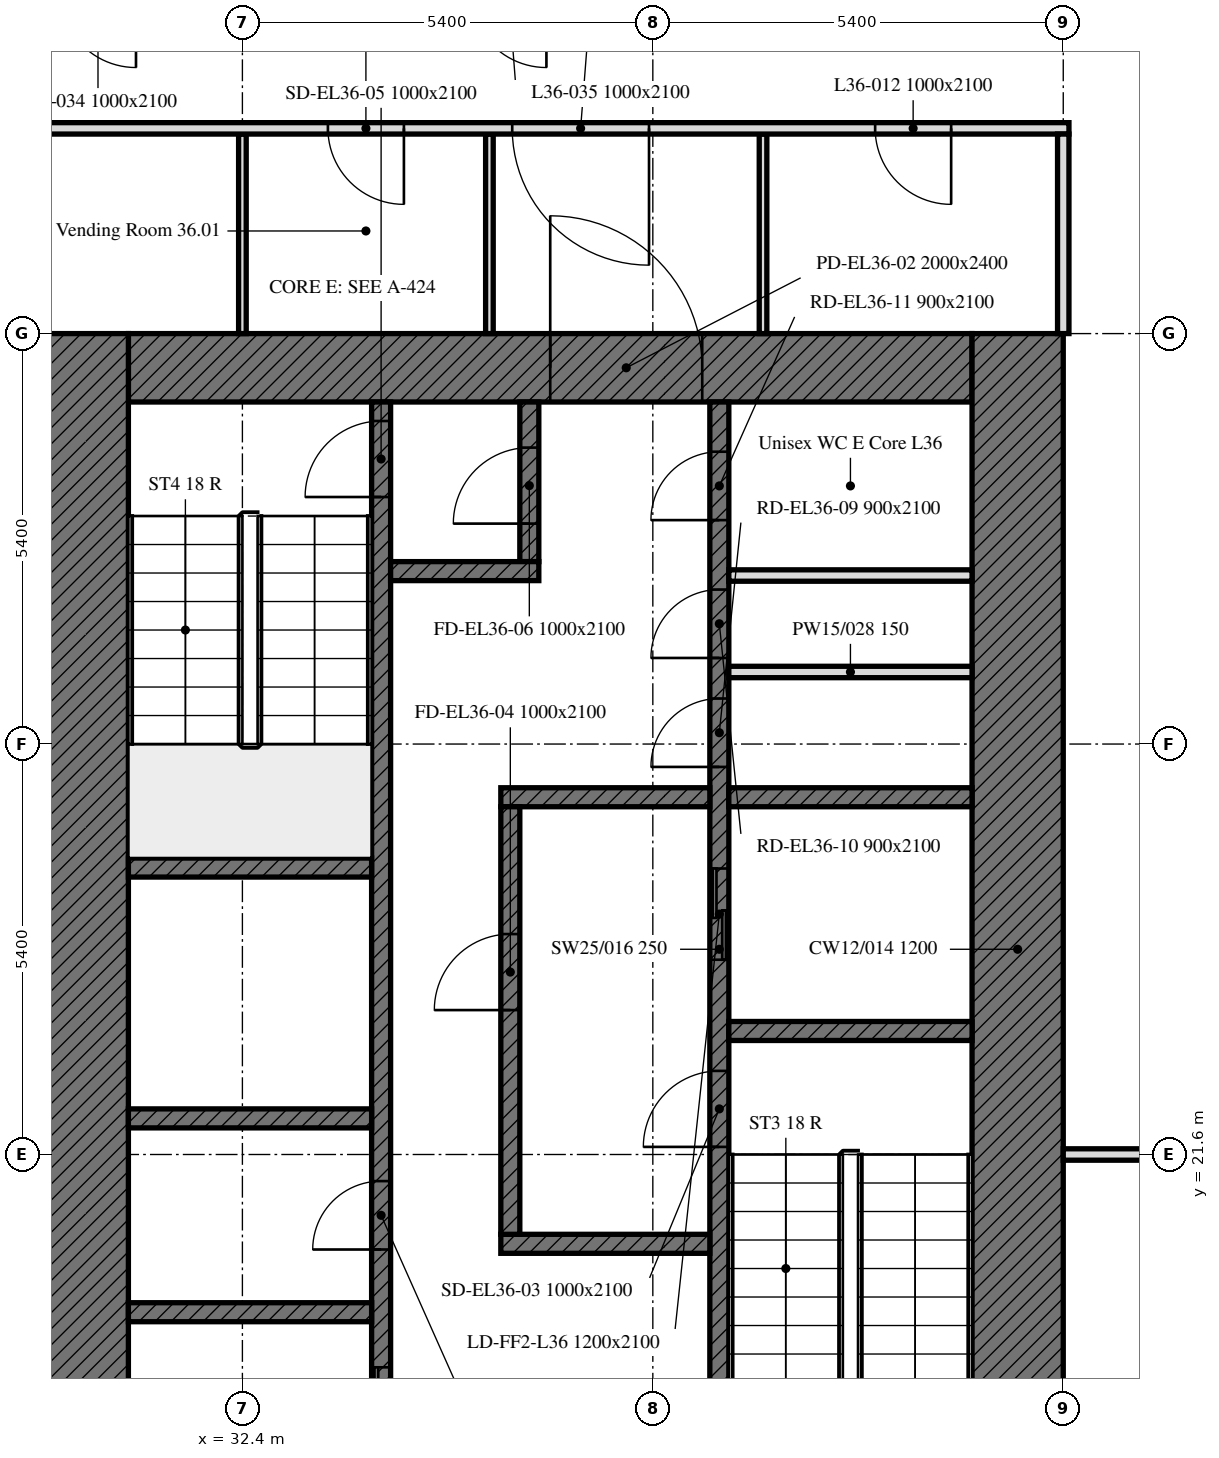
"""IFC4 building model, lengths in metres.
Left out: names, types, materials, properties, quantities, classifications, styles, units other than length and angle.
Written with IfcOpenShell. Run it as: python <this file> out.ifc"""

import sys

from ifc_helpers import new_model, si_unit, direction, frame, frame_2d, origin, place, context, subcontext, project, spatial, rectangle, extrude, element, fill, save


model = new_model("IFC4")
c1 = context("Model", 3, precision=1e-05, world=origin(), true_north=direction((0.0, 1.0)))
c2 = subcontext(c1, "Body", "Model", "MODEL_VIEW")
j1 = project(units=[si_unit("LENGTHUNIT", "METRE"), si_unit("PLANEANGLEUNIT", "RADIAN")], contexts=[c1])
p1 = place(None, origin())
s1 = spatial("IfcSite", under=j1, at=p1, CompositionType="ELEMENT")
p2 = place(p1, origin())
s2 = spatial("IfcBuilding", under=s1, at=p2, CompositionType="ELEMENT")
p3 = place(p2, frame((0.0, 0.0, 156.1)))
s3 = spatial("IfcBuildingStorey", under=s2, at=p3, CompositionType="ELEMENT", Elevation=156.1)
p4 = place(p3, frame((30.9, 31.95, 0.0), z_axis=(0.0, 0.0, 1.0), x_axis=(1.0, 0.0, 0.0)))
e1 = element("IfcWall", 1, at=p4, inside=s3, PredefinedType="SOLIDWALL", context=c2, shape_type="SweptSolid", body=[
    extrude(rectangle(XDim=11.1, YDim=0.9, at=frame_2d((5.55, 0.0))), origin(), (0.0, 0.0, 1.0), 3.0),
])
p5 = place(p4, frame((5.55, 0.0, 0.0)))
e2 = element("IfcOpeningElement", 2, at=p5, cuts=e1, PredefinedType="OPENING", context=c2, shape_type="SweptSolid", body=[
    extrude(rectangle(XDim=2.0, YDim=2.4, at=frame_2d((1.0, 1.2))), frame((0.0, 0.45, 0.0), z_axis=(0.0, -1.0, 0.0), x_axis=(1.0, 0.0, 0.0)), (0.0, 0.0, 1.0), 0.9),
])
for number, where, z_axis, x_axis in (
    (3, (42.6, 32.4, 0.0), (0.0, 0.0, 1.0), (0.0, -1.0, 0.0)),
    (4, (30.3, 16.2, 0.0), (0.0, 0.0, 1.0), (0.0, 1.0, 0.0)),
):
    element("IfcWall", number, at=place(p3, frame(where, z_axis=z_axis, x_axis=x_axis)), inside=s3, PredefinedType="SOLIDWALL", context=c2, shape_type="SweptSolid", body=[
        extrude(rectangle(XDim=16.2, YDim=1.2, at=frame_2d((8.1, 0.0))), origin(), (0.0, 0.0, 1.0), 3.0),
    ])
p6 = place(p3, frame((38.675, 17.1, 0.0), z_axis=(0.0, 0.0, 1.0), x_axis=(0.0, 1.0, 0.0)))
e5 = element("IfcWall", 5, at=p6, inside=s3, PredefinedType="SOLIDWALL", context=c2, shape_type="SweptSolid", body=[
    extrude(rectangle(XDim=14.4, YDim=0.25, at=frame_2d((7.2, 0.0))), origin(), (0.0, 0.0, 1.0), 3.0),
])
p7 = place(p6, frame((4.6, 0.0, 0.0)))
e6 = element("IfcOpeningElement", 6, at=p7, cuts=e5, PredefinedType="OPENING", context=c2, shape_type="SweptSolid", body=[
    extrude(rectangle(XDim=1.0, YDim=2.1, at=frame_2d((0.5, 1.05))), frame((0.0, 0.125, 0.0), z_axis=(0.0, -1.0, 0.0), x_axis=(1.0, 0.0, 0.0)), (0.0, 0.0, 1.0), 0.25),
])
p8 = place(p6, frame((7.062, 0.0, 0.0)))
e7 = element("IfcOpeningElement", 7, at=p8, cuts=e5, PredefinedType="OPENING", context=c2, shape_type="SweptSolid", body=[
    extrude(rectangle(XDim=1.2, YDim=2.1, at=frame_2d((0.6, 1.05))), frame((0.0, 0.125, 0.0), z_axis=(0.0, -1.0, 0.0), x_axis=(1.0, 0.0, 0.0)), (0.0, 0.0, 1.0), 0.25),
])
p9 = place(p6, frame((9.599, 0.0, 0.0)))
e8 = element("IfcOpeningElement", 8, at=p9, cuts=e5, PredefinedType="OPENING", context=c2, shape_type="SweptSolid", body=[
    extrude(rectangle(XDim=0.9, YDim=2.1, at=frame_2d((0.45, 1.05))), frame((0.0, 0.125, 0.0), z_axis=(0.0, -1.0, 0.0), x_axis=(1.0, 0.0, 0.0)), (0.0, 0.0, 1.0), 0.25),
])
p10 = place(p6, frame((11.032, 0.0, 0.0)))
e9 = element("IfcOpeningElement", 9, at=p10, cuts=e5, PredefinedType="OPENING", context=c2, shape_type="SweptSolid", body=[
    extrude(rectangle(XDim=0.9, YDim=2.1, at=frame_2d((0.45, 1.05))), frame((0.0, 0.125, 0.0), z_axis=(0.0, -1.0, 0.0), x_axis=(1.0, 0.0, 0.0)), (0.0, 0.0, 1.0), 0.25),
])
p11 = place(p6, frame((12.846, 0.0, 0.0)))
e10 = element("IfcOpeningElement", 10, at=p11, cuts=e5, PredefinedType="OPENING", context=c2, shape_type="SweptSolid", body=[
    extrude(rectangle(XDim=0.9, YDim=2.1, at=frame_2d((0.45, 1.05))), frame((0.0, 0.125, 0.0), z_axis=(0.0, -1.0, 0.0), x_axis=(1.0, 0.0, 0.0)), (0.0, 0.0, 1.0), 0.25),
])
p12 = place(p3, frame((34.225, 17.1, 0.0), z_axis=(0.0, 0.0, 1.0), x_axis=(0.0, 1.0, 0.0)))
e11 = element("IfcWall", 11, at=p12, inside=s3, PredefinedType="SOLIDWALL", context=c2, shape_type="SweptSolid", body=[
    extrude(rectangle(XDim=14.4, YDim=0.25, at=frame_2d((7.2, 0.0))), origin(), (0.0, 0.0, 1.0), 3.0),
])
p13 = place(p12, frame((13.15, 0.0, 0.0)))
e12 = element("IfcOpeningElement", 12, at=p13, cuts=e11, PredefinedType="OPENING", context=c2, shape_type="SweptSolid", body=[
    extrude(rectangle(XDim=1.0, YDim=2.1, at=frame_2d((0.5, 1.05))), frame((0.0, 0.125, 0.0), z_axis=(0.0, -1.0, 0.0), x_axis=(1.0, 0.0, 0.0)), (0.0, 0.0, 1.0), 0.25),
])
p14 = place(p12, frame((0.6, 0.0, 0.0)))
e13 = element("IfcOpeningElement", 13, at=p14, cuts=e11, PredefinedType="OPENING", context=c2, shape_type="SweptSolid", body=[
    extrude(rectangle(XDim=1.1, YDim=2.1, at=frame_2d((0.55, 1.05))), frame((0.0, 0.125, 0.0), z_axis=(0.0, -1.0, 0.0), x_axis=(1.0, 0.0, 0.0)), (0.0, 0.0, 1.0), 0.25),
])
p15 = place(p12, frame((3.25, 0.0, 0.0)))
e14 = element("IfcOpeningElement", 14, at=p15, cuts=e11, PredefinedType="OPENING", context=c2, shape_type="SweptSolid", body=[
    extrude(rectangle(XDim=0.9, YDim=2.1, at=frame_2d((0.45, 1.05))), frame((0.0, 0.125, 0.0), z_axis=(0.0, -1.0, 0.0), x_axis=(1.0, 0.0, 0.0)), (0.0, 0.0, 1.0), 0.25),
])
p16 = place(p3, frame((38.8, 23.225, 0.0), z_axis=(0.0, 0.0, 1.0), x_axis=(1.0, 0.0, 0.0)))
e15 = element("IfcWall", 15, at=p16, inside=s3, PredefinedType="SOLIDWALL", context=c2, shape_type="SweptSolid", body=[
    extrude(rectangle(XDim=3.2, YDim=0.25, at=frame_2d((1.6, 0.0))), origin(), (0.0, 0.0, 1.0), 3.0),
])
for number, where, z_axis, x_axis in (
    (16, (30.9, 25.375, 0.0), (0.0, 0.0, 1.0), (1.0, 0.0, 0.0)),
    (17, (30.9, 22.075, 0.0), (0.0, 0.0, 1.0), (1.0, 0.0, 0.0)),
):
    element("IfcWall", number, at=place(p3, frame(where, z_axis=z_axis, x_axis=x_axis)), inside=s3, PredefinedType="SOLIDWALL", context=c2, shape_type="SweptSolid", body=[
        extrude(rectangle(XDim=3.2, YDim=0.25, at=frame_2d((1.6, 0.0))), origin(), (0.0, 0.0, 1.0), 3.0),
    ])
p17 = place(p3, frame((38.8, 26.3, 0.0), z_axis=(0.0, 0.0, 1.0), x_axis=(1.0, 0.0, 0.0)))
e18 = element("IfcWall", 18, at=p17, inside=s3, PredefinedType="SOLIDWALL", context=c2, shape_type="SweptSolid", body=[
    extrude(rectangle(XDim=3.2, YDim=0.25, at=frame_2d((1.6, 0.0))), origin(), (0.0, 0.0, 1.0), 3.0),
])
for number, where, z_axis, x_axis in (
    (19, (35.8, 26.3, 0.0), (0.0, 0.0, 1.0), (1.0, 0.0, 0.0)),
    (20, (35.8, 20.425, 0.0), (0.0, 0.0, 1.0), (1.0, 0.0, 0.0)),
):
    element("IfcWall", number, at=place(p3, frame(where, z_axis=z_axis, x_axis=x_axis)), inside=s3, PredefinedType="SOLIDWALL", context=c2, shape_type="SweptSolid", body=[
        extrude(rectangle(XDim=2.75, YDim=0.25, at=frame_2d((1.375, 0.0))), origin(), (0.0, 0.0, 1.0), 3.0),
    ])
p18 = place(p3, frame((36.175, 29.4, 0.0), z_axis=(0.0, 0.0, 1.0), x_axis=(0.0, 1.0, 0.0)))
e21 = element("IfcWall", 21, at=p18, inside=s3, PredefinedType="SOLIDWALL", context=c2, shape_type="SweptSolid", body=[
    extrude(rectangle(XDim=2.1, YDim=0.25, at=frame_2d((1.05, 0.0))), origin(), (0.0, 0.0, 1.0), 3.0),
])
p19 = place(p18, frame((0.5, 0.0, 0.0)))
e22 = element("IfcOpeningElement", 22, at=p19, cuts=e21, PredefinedType="OPENING", context=c2, shape_type="SweptSolid", body=[
    extrude(rectangle(XDim=1.0, YDim=2.1, at=frame_2d((0.5, 1.05))), frame((0.0, 0.125, 0.0), z_axis=(0.0, -1.0, 0.0), x_axis=(1.0, 0.0, 0.0)), (0.0, 0.0, 1.0), 0.25),
])
p20 = place(p3, frame((34.35, 29.275, 0.0), z_axis=(0.0, 0.0, 1.0), x_axis=(1.0, 0.0, 0.0)))
e23 = element("IfcWall", 23, at=p20, inside=s3, PredefinedType="SOLIDWALL", context=c2, shape_type="SweptSolid", body=[
    extrude(rectangle(XDim=1.95, YDim=0.25, at=frame_2d((0.975, 0.0))), origin(), (0.0, 0.0, 1.0), 3.0),
])
p21 = place(p3, frame((35.925, 20.55, 0.0), z_axis=(0.0, 0.0, 1.0), x_axis=(0.0, 1.0, 0.0)))
e24 = element("IfcWall", 24, at=p21, inside=s3, PredefinedType="SOLIDWALL", context=c2, shape_type="SweptSolid", body=[
    extrude(rectangle(XDim=5.625, YDim=0.25, at=frame_2d((2.812, 0.0))), origin(), (0.0, 0.0, 1.0), 3.0),
])
p22 = place(p21, frame((2.95, 0.0, 0.0)))
e25 = element("IfcOpeningElement", 25, at=p22, cuts=e24, PredefinedType="OPENING", context=c2, shape_type="SweptSolid", body=[
    extrude(rectangle(XDim=1.0, YDim=2.1, at=frame_2d((0.5, 1.05))), frame((0.0, 0.125, 0.0), z_axis=(0.0, -1.0, 0.0), x_axis=(1.0, 0.0, 0.0)), (0.0, 0.0, 1.0), 0.25),
])
p23 = place(p3, frame((30.9, 19.525, 0.0), z_axis=(0.0, 0.0, 1.0), x_axis=(1.0, 0.0, 0.0)))
e26 = element("IfcWall", 26, at=p23, inside=s3, PredefinedType="SOLIDWALL", context=c2, shape_type="SweptSolid", body=[
    extrude(rectangle(XDim=3.2, YDim=0.25, at=frame_2d((1.6, 0.0))), origin(), (0.0, 0.0, 1.0), 3.0),
])
for number, where, z_axis, x_axis in (
    (27, (38.8, 27.948, 0.0), (0.0, 0.0, 1.0), (1.0, 0.0, 0.0)),
    (28, (38.8, 29.217, 0.0), (0.0, 0.0, 1.0), (1.0, 0.0, 0.0)),
):
    element("IfcWall", number, at=place(p3, frame(where, z_axis=z_axis, x_axis=x_axis)), inside=s3, PredefinedType="PARTITIONING", context=c2, shape_type="SweptSolid", body=[
        extrude(rectangle(XDim=3.2, YDim=0.15, at=frame_2d((1.6, 0.0))), origin(), (0.0, 0.0, 1.0), 3.0),
    ])
for number, where, z_axis, x_axis in (
    (29, (32.4, 32.4, 0.0), (0.0, 0.0, 1.0), (0.0, 1.0, 0.0)),
    (30, (35.65, 35.025, 0.0), (0.0, 0.0, 1.0), (0.0, -1.0, 0.0)),
    (31, (39.25, 32.4, 0.0), (0.0, 0.0, 1.0), (0.0, 1.0, 0.0)),
):
    element("IfcWall", number, at=place(p3, frame(where, z_axis=z_axis, x_axis=x_axis)), inside=s3, PredefinedType="PARTITIONING", context=c2, shape_type="SweptSolid", body=[
        extrude(rectangle(XDim=2.625, YDim=0.1, at=frame_2d((1.312, 0.0))), origin(), (0.0, 0.0, 1.0), 3.0),
    ])
p24 = place(p3, frame((43.2, 21.6, 0.0), z_axis=(0.0, 0.0, 1.0), x_axis=(1.0, 0.0, 0.0)))
e32 = element("IfcWall", 32, at=p24, inside=s3, PredefinedType="PARTITIONING", context=c2, shape_type="SweptSolid", body=[
    extrude(rectangle(XDim=4.649, YDim=0.15, at=frame_2d((2.325, 0.0))), origin(), (0.0, 0.0, 1.0), 2.4),
])
p25 = place(p3, frame((43.275, 35.1, 0.0), z_axis=(0.0, 0.0, 1.0), x_axis=(-1.0, 0.0, 0.0)))
e33 = element("IfcWall", 33, at=p25, inside=s3, PredefinedType="PARTITIONING", context=c2, shape_type="SweptSolid", body=[
    extrude(rectangle(XDim=37.124, YDim=0.15, at=frame_2d((18.562, 0.0))), origin(), (0.0, 0.0, 1.0), 3.0),
])
p26 = place(p25, frame((18.475, 0.0, 0.0)))
e34 = element("IfcOpeningElement", 34, at=p26, cuts=e33, PredefinedType="OPENING", context=c2, shape_type="SweptSolid", body=[
    extrude(rectangle(XDim=1.0, YDim=2.1, at=frame_2d((0.5, 1.05))), frame((0.0, 0.075, 0.0), z_axis=(0.0, -1.0, 0.0), x_axis=(1.0, 0.0, 0.0)), (0.0, 0.0, 1.0), 0.15),
])
p27 = place(p25, frame((34.095, 0.0, 0.0)))
e35 = element("IfcOpeningElement", 35, at=p27, cuts=e33, PredefinedType="OPENING", context=c2, shape_type="SweptSolid", body=[
    extrude(rectangle(XDim=1.0, YDim=2.1, at=frame_2d((0.5, 1.05))), frame((0.0, 0.075, 0.0), z_axis=(0.0, -1.0, 0.0), x_axis=(1.0, 0.0, 0.0)), (0.0, 0.0, 1.0), 0.15),
])
p28 = place(p25, frame((8.75, 0.0, 0.0)))
e36 = element("IfcOpeningElement", 36, at=p28, cuts=e33, PredefinedType="OPENING", context=c2, shape_type="SweptSolid", body=[
    extrude(rectangle(XDim=1.0, YDim=2.1, at=frame_2d((0.5, 1.05))), frame((0.0, 0.075, 0.0), z_axis=(0.0, -1.0, 0.0), x_axis=(1.0, 0.0, 0.0)), (0.0, 0.0, 1.0), 0.15),
])
p29 = place(p25, frame((1.55, 0.0, 0.0)))
e37 = element("IfcOpeningElement", 37, at=p29, cuts=e33, PredefinedType="OPENING", context=c2, shape_type="SweptSolid", body=[
    extrude(rectangle(XDim=1.0, YDim=2.1, at=frame_2d((0.5, 1.05))), frame((0.0, 0.075, 0.0), z_axis=(0.0, -1.0, 0.0), x_axis=(1.0, 0.0, 0.0)), (0.0, 0.0, 1.0), 0.15),
])
p30 = place(p25, frame((28.2, 0.0, 0.0)))
e38 = element("IfcOpeningElement", 38, at=p30, cuts=e33, PredefinedType="OPENING", context=c2, shape_type="SweptSolid", body=[
    extrude(rectangle(XDim=1.0, YDim=2.1, at=frame_2d((0.5, 1.05))), frame((0.0, 0.075, 0.0), z_axis=(0.0, -1.0, 0.0), x_axis=(1.0, 0.0, 0.0)), (0.0, 0.0, 1.0), 0.15),
])
p31 = place(p25, frame((30.625, 0.0, 0.0)))
e39 = element("IfcOpeningElement", 39, at=p31, cuts=e33, PredefinedType="OPENING", context=c2, shape_type="SweptSolid", body=[
    extrude(rectangle(XDim=1.8, YDim=2.4, at=frame_2d((0.9, 1.2))), frame((0.0, 0.075, 0.0), z_axis=(0.0, -1.0, 0.0), x_axis=(1.0, 0.0, 0.0)), (0.0, 0.0, 1.0), 0.15),
])
p32 = place(p25, frame((5.525, 0.0, 0.0)))
e40 = element("IfcOpeningElement", 40, at=p32, cuts=e33, PredefinedType="OPENING", context=c2, shape_type="SweptSolid", body=[
    extrude(rectangle(XDim=1.8, YDim=2.4, at=frame_2d((0.9, 1.2))), frame((0.0, 0.075, 0.0), z_axis=(0.0, -1.0, 0.0), x_axis=(1.0, 0.0, 0.0)), (0.0, 0.0, 1.0), 0.15),
])
p33 = place(p3, frame((43.2, 35.025, 0.0), z_axis=(0.0, 0.0, 1.0), x_axis=(0.0, -1.0, 0.0)))
e41 = element("IfcWall", 41, at=p33, inside=s3, PredefinedType="PARTITIONING", context=c2, shape_type="SweptSolid", body=[
    extrude(rectangle(XDim=2.625, YDim=0.15, at=frame_2d((1.312, 0.0))), origin(), (0.0, 0.0, 1.0), 3.0),
])
p34 = place(p5, origin())
e42 = element("IfcDoor", 42, at=p34, inside=s3, OperationType="DOUBLE_DOOR_SINGLE_SWING", PredefinedType="DOOR", context=c2, shape_type="SweptSolid", body=[
    extrude(rectangle(XDim=2.0, YDim=2.4, at=frame_2d((1.0, 1.2))), frame((0.0, 0.025, 0.0), z_axis=(0.0, -1.0, 0.0), x_axis=(1.0, 0.0, 0.0)), (0.0, 0.0, 1.0), 0.05),
])
fill(e2, e42)
p35 = place(p7, origin())
e43 = element("IfcDoor", 43, at=p35, inside=s3, OperationType="SINGLE_SWING_LEFT", PredefinedType="DOOR", context=c2, shape_type="SweptSolid", body=[
    extrude(rectangle(XDim=1.0, YDim=2.1, at=frame_2d((0.5, 1.05))), frame((0.0, 0.025, 0.0), z_axis=(0.0, -1.0, 0.0), x_axis=(1.0, 0.0, 0.0)), (0.0, 0.0, 1.0), 0.05),
])
fill(e6, e43)
p36 = place(p22, origin())
e44 = element("IfcDoor", 44, at=p36, inside=s3, OperationType="SINGLE_SWING_LEFT", PredefinedType="DOOR", context=c2, shape_type="SweptSolid", body=[
    extrude(rectangle(XDim=1.0, YDim=2.1, at=frame_2d((0.5, 1.05))), frame((0.0, 0.025, 0.0), z_axis=(0.0, -1.0, 0.0), x_axis=(1.0, 0.0, 0.0)), (0.0, 0.0, 1.0), 0.05),
])
fill(e25, e44)
p37 = place(p13, origin())
e45 = element("IfcDoor", 45, at=p37, inside=s3, OperationType="SINGLE_SWING_LEFT", PredefinedType="DOOR", context=c2, shape_type="SweptSolid", body=[
    extrude(rectangle(XDim=1.0, YDim=2.1, at=frame_2d((0.5, 1.05))), frame((0.0, 0.025, 0.0), z_axis=(0.0, -1.0, 0.0), x_axis=(1.0, 0.0, 0.0)), (0.0, 0.0, 1.0), 0.05),
])
fill(e12, e45)
p38 = place(p19, origin())
e46 = element("IfcDoor", 46, at=p38, inside=s3, OperationType="SINGLE_SWING_LEFT", PredefinedType="DOOR", context=c2, shape_type="SweptSolid", body=[
    extrude(rectangle(XDim=1.0, YDim=2.1, at=frame_2d((0.5, 1.05))), frame((0.0, 0.025, 0.0), z_axis=(0.0, -1.0, 0.0), x_axis=(1.0, 0.0, 0.0)), (0.0, 0.0, 1.0), 0.05),
])
fill(e22, e46)
p39 = place(p8, origin())
e47 = element("IfcDoor", 47, at=p39, inside=s3, OperationType="DOUBLE_DOOR_SLIDING", PredefinedType="DOOR", context=c2, shape_type="SweptSolid", body=[
    extrude(rectangle(XDim=1.2, YDim=2.1, at=frame_2d((0.6, 1.05))), frame((0.0, 0.025, 0.0), z_axis=(0.0, -1.0, 0.0), x_axis=(1.0, 0.0, 0.0)), (0.0, 0.0, 1.0), 0.05),
])
fill(e7, e47)
p40 = place(p14, origin())
e48 = element("IfcDoor", 48, at=p40, inside=s3, OperationType="DOUBLE_DOOR_SLIDING", PredefinedType="DOOR", context=c2, shape_type="SweptSolid", body=[
    extrude(rectangle(XDim=1.1, YDim=2.1, at=frame_2d((0.55, 1.05))), frame((0.0, 0.025, 0.0), z_axis=(0.0, -1.0, 0.0), x_axis=(1.0, 0.0, 0.0)), (0.0, 0.0, 1.0), 0.05),
])
fill(e13, e48)
p41 = place(p9, origin())
e49 = element("IfcDoor", 49, at=p41, inside=s3, OperationType="SINGLE_SWING_LEFT", PredefinedType="DOOR", context=c2, shape_type="SweptSolid", body=[
    extrude(rectangle(XDim=0.9, YDim=2.1, at=frame_2d((0.45, 1.05))), frame((0.0, 0.025, 0.0), z_axis=(0.0, -1.0, 0.0), x_axis=(1.0, 0.0, 0.0)), (0.0, 0.0, 1.0), 0.05),
])
fill(e8, e49)
p42 = place(p10, origin())
e50 = element("IfcDoor", 50, at=p42, inside=s3, OperationType="SINGLE_SWING_LEFT", PredefinedType="DOOR", context=c2, shape_type="SweptSolid", body=[
    extrude(rectangle(XDim=0.9, YDim=2.1, at=frame_2d((0.45, 1.05))), frame((0.0, 0.025, 0.0), z_axis=(0.0, -1.0, 0.0), x_axis=(1.0, 0.0, 0.0)), (0.0, 0.0, 1.0), 0.05),
])
fill(e9, e50)
p43 = place(p11, origin())
e51 = element("IfcDoor", 51, at=p43, inside=s3, OperationType="SINGLE_SWING_LEFT", PredefinedType="DOOR", context=c2, shape_type="SweptSolid", body=[
    extrude(rectangle(XDim=0.9, YDim=2.1, at=frame_2d((0.45, 1.05))), frame((0.0, 0.025, 0.0), z_axis=(0.0, -1.0, 0.0), x_axis=(1.0, 0.0, 0.0)), (0.0, 0.0, 1.0), 0.05),
])
fill(e10, e51)
p44 = place(p15, origin())
e52 = element("IfcDoor", 52, at=p44, inside=s3, OperationType="SINGLE_SWING_LEFT", PredefinedType="DOOR", context=c2, shape_type="SweptSolid", body=[
    extrude(rectangle(XDim=0.9, YDim=2.1, at=frame_2d((0.45, 1.05))), frame((0.0, 0.025, 0.0), z_axis=(0.0, -1.0, 0.0), x_axis=(1.0, 0.0, 0.0)), (0.0, 0.0, 1.0), 0.05),
])
fill(e14, e52)
p45 = place(p28, origin())
e53 = element("IfcDoor", 53, at=p45, inside=s3, OperationType="SINGLE_SWING_RIGHT", PredefinedType="DOOR", context=c2, shape_type="SweptSolid", body=[
    extrude(rectangle(XDim=1.0, YDim=2.1, at=frame_2d((0.5, 1.05))), frame((0.0, 0.025, 0.0), z_axis=(0.0, -1.0, 0.0), x_axis=(1.0, 0.0, 0.0)), (0.0, 0.0, 1.0), 0.05),
])
fill(e36, e53)
p46 = place(p29, origin())
e54 = element("IfcDoor", 54, at=p46, inside=s3, OperationType="SINGLE_SWING_LEFT", PredefinedType="DOOR", context=c2, shape_type="SweptSolid", body=[
    extrude(rectangle(XDim=1.0, YDim=2.1, at=frame_2d((0.5, 1.05))), frame((0.0, 0.025, 0.0), z_axis=(0.0, -1.0, 0.0), x_axis=(1.0, 0.0, 0.0)), (0.0, 0.0, 1.0), 0.05),
])
fill(e37, e54)
p47 = place(p32, origin())
e55 = element("IfcDoor", 55, at=p47, inside=s3, OperationType="DOUBLE_DOOR_SINGLE_SWING", PredefinedType="DOOR", context=c2, shape_type="SweptSolid", body=[
    extrude(rectangle(XDim=1.8, YDim=2.4, at=frame_2d((0.9, 1.2))), frame((0.0, 0.025, 0.0), z_axis=(0.0, -1.0, 0.0), x_axis=(1.0, 0.0, 0.0)), (0.0, 0.0, 1.0), 0.05),
])
fill(e40, e55)
save(model, sys.argv[1])
